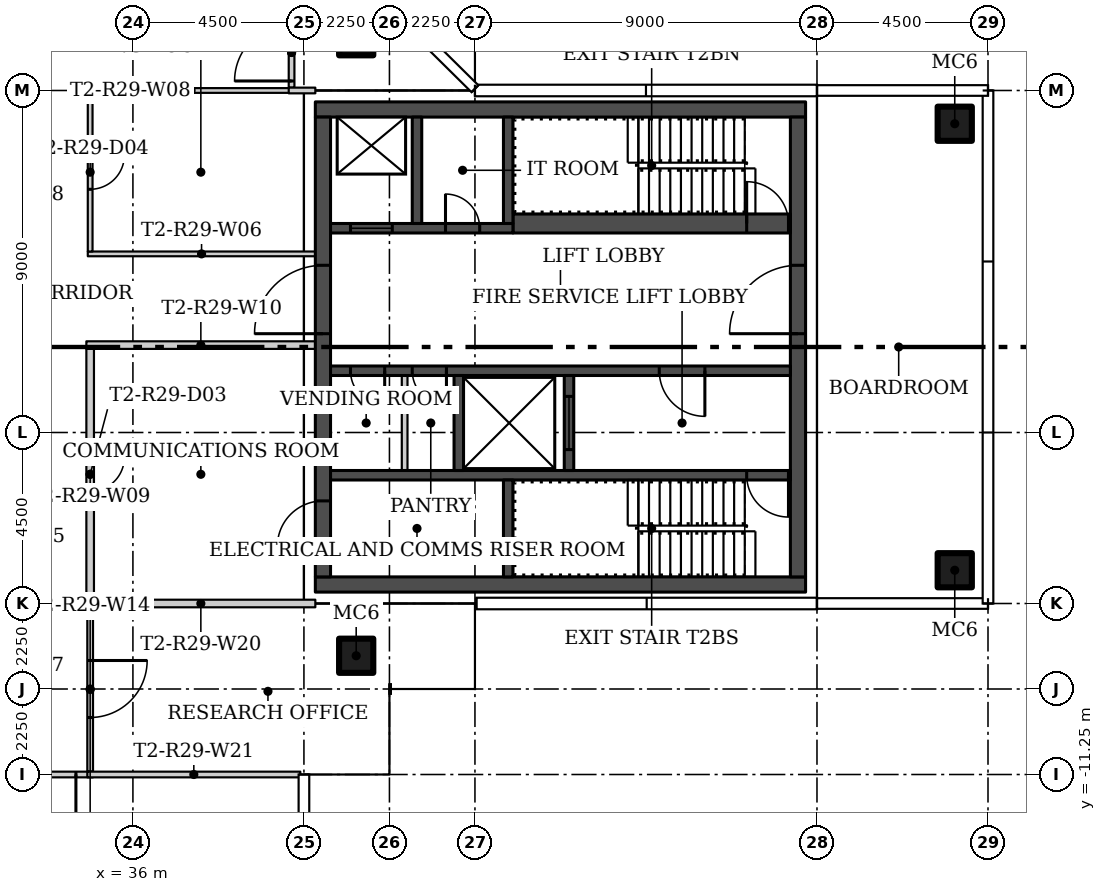
"""IFC4 building model, lengths in metres.
Left out: names, types, materials, properties, quantities, classifications, styles, units other than length and angle.
Written with IfcOpenShell. Run it as: python <this file> out.ifc"""

import sys

from ifc_helpers import new_model, si_unit, direction, frame, frame_2d, origin, origin_2d, place, context, subcontext, project, spatial, rectangle, hollow_rectangle, extrude, element, fill, save


model = new_model("IFC4")
c1 = context("Model", 3, precision=1e-05, world=origin(), true_north=direction((0.0, 1.0)))
c2 = subcontext(c1, "Body", "Model", "MODEL_VIEW")
j1 = project(units=[si_unit("LENGTHUNIT", "METRE"), si_unit("PLANEANGLEUNIT", "RADIAN")], contexts=[c1])
p1 = place(None, origin())
s1 = spatial("IfcSite", under=j1, at=p1, CompositionType="ELEMENT")
p2 = place(p1, origin())
s2 = spatial("IfcBuilding", under=s1, at=p2, CompositionType="ELEMENT")
p3 = place(p2, frame((0.0, 0.0, 261.6)))
s3 = spatial("IfcBuildingStorey", under=s2, at=p3, CompositionType="ELEMENT", Elevation=261.6)
for number, where in (
    (1, (41.875, 8.125, 0.0)),
    (2, (41.875, -8.125, 0.0)),
    (3, (57.625, -5.875, 0.0)),
    (4, (57.625, 5.875, 0.0)),
):
    element("IfcColumn", number, at=place(p3, frame(where)), inside=s3, PredefinedType="COLUMN", context=c2, shape_type="SweptSolid", body=[
        extrude(hollow_rectangle(XDim=0.9, YDim=0.9, WallThickness=0.036, at=origin_2d()), origin(), (0.0, 0.0, 1.0), 3.55),
    ])
p4 = place(p3, frame((34.812, 2.45, 0.0)))
e5 = element("IfcWall", 5, at=p4, inside=s3, PredefinedType="PARTITIONING", context=c2, shape_type="SweptSolid", body=[
    extrude(rectangle(XDim=5.988, YDim=0.125, at=frame_2d((2.994, 0.0))), origin(), (0.0, 0.0, 1.0), 3.55),
])
p5 = place(p3, frame((34.875, 6.688, 0.0), z_axis=(0.0, 0.0, 1.0), x_axis=(0.0, -1.0, 0.0)))
e6 = element("IfcWall", 6, at=p5, inside=s3, PredefinedType="PARTITIONING", context=c2, shape_type="SweptSolid", body=[
    extrude(rectangle(XDim=4.175, YDim=0.125, at=frame_2d((2.087, 0.0))), origin(), (0.0, 0.0, 1.0), 3.55),
])
p6 = place(p5, frame((1.637, 0.0, 0.0)))
e7 = element("IfcOpeningElement", 7, at=p6, cuts=e6, PredefinedType="OPENING", context=c2, shape_type="SweptSolid", body=[
    extrude(rectangle(XDim=0.9, YDim=2.1, at=frame_2d((0.45, 1.05))), frame((0.0, 0.073, 0.0), z_axis=(0.0, -1.0, 0.0), x_axis=(1.0, 0.0, 0.0)), (0.0, 0.0, 1.0), 0.145),
])
p7 = place(p3, frame((40.25, 6.75, 0.0), z_axis=(0.0, 0.0, 1.0), x_axis=(-1.0, 0.0, 0.0)))
e8 = element("IfcWall", 8, at=p7, inside=s3, PredefinedType="PARTITIONING", context=c2, shape_type="SweptSolid", body=[
    extrude(rectangle(XDim=5.437, YDim=0.125, at=frame_2d((2.719, 0.0))), origin(), (0.0, 0.0, 1.0), 3.55),
])
p8 = place(p3, frame((34.875, -0.05, 0.0), z_axis=(0.0, 0.0, 1.0), x_axis=(0.0, -1.0, 0.0)))
e9 = element("IfcWall", 9, at=p8, inside=s3, PredefinedType="PARTITIONING", context=c2, shape_type="SweptSolid", body=[
    extrude(rectangle(XDim=6.6, YDim=0.2, at=frame_2d((3.3, 0.0))), origin(), (0.0, 0.0, 1.0), 3.55),
])
p9 = place(p8, frame((2.85, 0.0, 0.0)))
e10 = element("IfcOpeningElement", 10, at=p9, cuts=e9, PredefinedType="OPENING", context=c2, shape_type="SweptSolid", body=[
    extrude(rectangle(XDim=0.9, YDim=2.1, at=frame_2d((0.45, 1.05))), frame((0.0, 0.11, 0.0), z_axis=(0.0, -1.0, 0.0), x_axis=(1.0, 0.0, 0.0)), (0.0, 0.0, 1.0), 0.22),
])
p10 = place(p3, frame((40.8, 0.05, 0.0), z_axis=(0.0, 0.0, 1.0), x_axis=(-1.0, 0.0, 0.0)))
e11 = element("IfcWall", 11, at=p10, inside=s3, PredefinedType="PARTITIONING", context=c2, shape_type="SweptSolid", body=[
    extrude(rectangle(XDim=6.025, YDim=0.2, at=frame_2d((3.013, 0.0))), origin(), (0.0, 0.0, 1.0), 3.55),
])
p11 = place(p3, frame((40.175, 6.825, 0.0), z_axis=(0.0, 0.0, 1.0), x_axis=(0.0, 1.0, 0.0)))
e12 = element("IfcWall", 12, at=p11, inside=s3, PredefinedType="PARTITIONING", context=c2, shape_type="SweptSolid", body=[
    extrude(rectangle(XDim=1.85, YDim=0.15, at=frame_2d((0.925, 0.0))), origin(), (0.0, 0.0, 1.0), 3.55),
])
p12 = place(p11, frame((0.175, 0.0, 0.0)))
e13 = element("IfcOpeningElement", 13, at=p12, cuts=e12, PredefinedType="OPENING", context=c2, shape_type="SweptSolid", body=[
    extrude(rectangle(XDim=1.5, YDim=2.1, at=frame_2d((0.75, 1.05))), frame((0.0, 0.085, 0.0), z_axis=(0.0, -1.0, 0.0), x_axis=(1.0, 0.0, 0.0)), (0.0, 0.0, 1.0), 0.17),
])
p13 = place(p3, frame((34.875, -6.85, 0.0), z_axis=(0.0, 0.0, 1.0), x_axis=(0.0, -1.0, 0.0)))
e14 = element("IfcWall", 14, at=p13, inside=s3, PredefinedType="PARTITIONING", context=c2, shape_type="SweptSolid", body=[
    extrude(rectangle(XDim=4.325, YDim=0.15, at=frame_2d((2.163, 0.0))), origin(), (0.0, 0.0, 1.0), 3.55),
])
p14 = place(p13, frame((1.4, 0.0, 0.0)))
e15 = element("IfcOpeningElement", 15, at=p14, cuts=e14, PredefinedType="OPENING", context=c2, shape_type="SweptSolid", body=[
    extrude(rectangle(XDim=1.5, YDim=2.1, at=frame_2d((0.75, 1.05))), frame((0.0, 0.085, 0.0), z_axis=(0.0, -1.0, 0.0), x_axis=(1.0, 0.0, 0.0)), (0.0, 0.0, 1.0), 0.17),
])
p15 = place(p3, frame((34.95, -11.25, 0.0), z_axis=(0.0, 0.0, 1.0), x_axis=(-1.0, 0.0, 0.0)))
e16 = element("IfcWall", 16, at=p15, inside=s3, PredefinedType="PARTITIONING", context=c2, shape_type="SweptSolid", body=[
    extrude(rectangle(XDim=2.4, YDim=0.15, at=frame_2d((1.2, 0.0))), origin(), (0.0, 0.0, 1.0), 3.55),
])
p16 = place(p15, frame((0.45, 0.0, 0.0)))
e17 = element("IfcOpeningElement", 17, at=p16, cuts=e16, PredefinedType="OPENING", context=c2, shape_type="SweptSolid", body=[
    extrude(rectangle(XDim=1.5, YDim=2.1, at=frame_2d((0.75, 1.05))), frame((0.0, 0.085, 0.0), z_axis=(0.0, -1.0, 0.0), x_axis=(1.0, 0.0, 0.0)), (0.0, 0.0, 1.0), 0.17),
])
p17 = place(p3, frame((40.8, 6.75, 0.0), z_axis=(0.0, 0.0, 1.0), x_axis=(-1.0, 0.0, 0.0)))
e18 = element("IfcWall", 18, at=p17, inside=s3, PredefinedType="PARTITIONING", context=c2, shape_type="SweptSolid", body=[
    extrude(rectangle(XDim=0.7, YDim=0.15, at=frame_2d((0.35, 0.0))), origin(), (0.0, 0.0, 1.0), 3.55),
])
p18 = place(p3, frame((34.775, -6.75, 0.0)))
e19 = element("IfcWall", 19, at=p18, inside=s3, PredefinedType="PARTITIONING", context=c2, shape_type="SweptSolid", body=[
    extrude(rectangle(XDim=6.025, YDim=0.2, at=frame_2d((3.013, 0.0))), origin(), (0.0, 0.0, 1.0), 3.55),
])
p19 = place(p3, frame((34.8, -11.25, 0.0)))
e20 = element("IfcWall", 20, at=p19, inside=s3, PredefinedType="PARTITIONING", context=c2, shape_type="SweptSolid", body=[
    extrude(rectangle(XDim=5.605, YDim=0.15, at=frame_2d((2.802, 0.0))), origin(), (0.0, 0.0, 1.0), 3.55),
])
for number, where, z_axis, x_axis in (
    (21, (53.7, -6.25, 0.0), (0.0, 0.0, 1.0), (-1.0, 0.0, 0.0)),
    (22, (53.7, 6.25, 0.0), (0.0, 0.0, 1.0), (-1.0, 0.0, 0.0)),
):
    element("IfcWall", number, at=place(p3, frame(where, z_axis=z_axis, x_axis=x_axis)), inside=s3, PredefinedType="SHEAR", context=c2, shape_type="SweptSolid", body=[
        extrude(rectangle(XDim=12.9, YDim=0.4, at=frame_2d((6.45, 0.0))), origin(), (0.0, 0.0, 1.0), 3.55),
    ])
p20 = place(p3, frame((53.5, -6.05, 0.0), z_axis=(0.0, 0.0, 1.0), x_axis=(0.0, 1.0, 0.0)))
e23 = element("IfcWall", 23, at=p20, inside=s3, PredefinedType="SHEAR", context=c2, shape_type="SweptSolid", body=[
    extrude(rectangle(XDim=12.1, YDim=0.4, at=frame_2d((6.05, 0.0))), origin(), (0.0, 0.0, 1.0), 3.55),
])
p21 = place(p20, frame((6.4, 0.0, 0.0)))
e24 = element("IfcOpeningElement", 24, at=p21, cuts=e23, PredefinedType="OPENING", context=c2, shape_type="SweptSolid", body=[
    extrude(rectangle(XDim=1.8, YDim=2.4, at=frame_2d((0.9, 1.2))), frame((0.0, 0.21, 0.0), z_axis=(0.0, -1.0, 0.0), x_axis=(1.0, 0.0, 0.0)), (0.0, 0.0, 1.0), 0.42),
])
p22 = place(p3, frame((41.0, -6.05, 0.0), z_axis=(0.0, 0.0, 1.0), x_axis=(0.0, 1.0, 0.0)))
e25 = element("IfcWall", 25, at=p22, inside=s3, PredefinedType="SHEAR", context=c2, shape_type="SweptSolid", body=[
    extrude(rectangle(XDim=12.1, YDim=0.4, at=frame_2d((6.05, 0.0))), origin(), (0.0, 0.0, 1.0), 3.55),
])
p23 = place(p22, frame((0.8, 0.0, 0.0)))
e26 = element("IfcOpeningElement", 26, at=p23, cuts=e25, PredefinedType="OPENING", context=c2, shape_type="SweptSolid", body=[
    extrude(rectangle(XDim=1.2, YDim=2.1, at=frame_2d((0.6, 1.05))), frame((0.0, 0.21, 0.0), z_axis=(0.0, -1.0, 0.0), x_axis=(1.0, 0.0, 0.0)), (0.0, 0.0, 1.0), 0.42),
])
p24 = place(p22, frame((6.4, 0.0, 0.0)))
e27 = element("IfcOpeningElement", 27, at=p24, cuts=e25, PredefinedType="OPENING", context=c2, shape_type="SweptSolid", body=[
    extrude(rectangle(XDim=1.8, YDim=2.4, at=frame_2d((0.9, 1.2))), frame((0.0, 0.21, 0.0), z_axis=(0.0, -1.0, 0.0), x_axis=(1.0, 0.0, 0.0)), (0.0, 0.0, 1.0), 0.42),
])
p25 = place(p3, frame((53.3, -3.375, 0.0), z_axis=(0.0, 0.0, 1.0), x_axis=(-1.0, 0.0, 0.0)))
e28 = element("IfcWall", 28, at=p25, inside=s3, PredefinedType="SHEAR", context=c2, shape_type="SweptSolid", body=[
    extrude(rectangle(XDim=12.1, YDim=0.25, at=frame_2d((6.05, 0.0))), origin(), (0.0, 0.0, 1.0), 3.55),
])
p26 = place(p25, frame((0.05, 0.0, 0.0)))
e29 = element("IfcOpeningElement", 29, at=p26, cuts=e28, PredefinedType="OPENING", context=c2, shape_type="SweptSolid", body=[
    extrude(rectangle(XDim=1.1, YDim=2.1, at=frame_2d((0.55, 1.05))), frame((0.0, 0.135, 0.0), z_axis=(0.0, -1.0, 0.0), x_axis=(1.0, 0.0, 0.0)), (0.0, 0.0, 1.0), 0.27),
])
p27 = place(p3, frame((45.875, -6.05, 0.0), z_axis=(0.0, 0.0, 1.0), x_axis=(0.0, 1.0, 0.0)))
e30 = element("IfcWall", 30, at=p27, inside=s3, PredefinedType="SHEAR", context=c2, shape_type="SweptSolid", body=[
    extrude(rectangle(XDim=2.55, YDim=0.25, at=frame_2d((1.275, 0.0))), origin(), (0.0, 0.0, 1.0), 3.55),
])
p28 = place(p3, frame((53.3, -0.625, 0.0), z_axis=(0.0, 0.0, 1.0), x_axis=(-1.0, 0.0, 0.0)))
e31 = element("IfcWall", 31, at=p28, inside=s3, PredefinedType="SHEAR", context=c2, shape_type="SweptSolid", body=[
    extrude(rectangle(XDim=12.1, YDim=0.25, at=frame_2d((6.05, 0.0))), origin(), (0.0, 0.0, 1.0), 3.55),
])
p29 = place(p28, frame((2.25, 0.0, 0.0)))
e32 = element("IfcOpeningElement", 32, at=p29, cuts=e31, PredefinedType="OPENING", context=c2, shape_type="SweptSolid", body=[
    extrude(rectangle(XDim=1.2, YDim=2.1, at=frame_2d((0.6, 1.05))), frame((0.0, 0.135, 0.0), z_axis=(0.0, -1.0, 0.0), x_axis=(1.0, 0.0, 0.0)), (0.0, 0.0, 1.0), 0.27),
])
p30 = place(p28, frame((9.05, 0.0, 0.0)))
e33 = element("IfcOpeningElement", 33, at=p30, cuts=e31, PredefinedType="OPENING", context=c2, shape_type="SweptSolid", body=[
    extrude(rectangle(XDim=0.9, YDim=2.1, at=frame_2d((0.45, 1.05))), frame((0.0, 0.135, 0.0), z_axis=(0.0, -1.0, 0.0), x_axis=(1.0, 0.0, 0.0)), (0.0, 0.0, 1.0), 0.27),
])
p31 = place(p28, frame((10.675, 0.0, 0.0)))
e34 = element("IfcOpeningElement", 34, at=p31, cuts=e31, PredefinedType="OPENING", context=c2, shape_type="SweptSolid", body=[
    extrude(rectangle(XDim=0.9, YDim=2.1, at=frame_2d((0.45, 1.05))), frame((0.0, 0.135, 0.0), z_axis=(0.0, -1.0, 0.0), x_axis=(1.0, 0.0, 0.0)), (0.0, 0.0, 1.0), 0.27),
])
p32 = place(p3, frame((47.475, -3.25, 0.0), z_axis=(0.0, 0.0, 1.0), x_axis=(0.0, 1.0, 0.0)))
e35 = element("IfcWall", 35, at=p32, inside=s3, PredefinedType="SHEAR", context=c2, shape_type="SweptSolid", body=[
    extrude(rectangle(XDim=2.5, YDim=0.25, at=frame_2d((1.25, 0.0))), origin(), (0.0, 0.0, 1.0), 3.55),
])
p33 = place(p32, frame((0.55, 0.0, 0.0)))
e36 = element("IfcOpeningElement", 36, at=p33, cuts=e35, PredefinedType="OPENING", context=c2, shape_type="SweptSolid", body=[
    extrude(rectangle(XDim=1.4, YDim=2.4, at=frame_2d((0.7, 1.2))), frame((0.0, 0.135, 0.0), z_axis=(0.0, -1.0, 0.0), x_axis=(1.0, 0.0, 0.0)), (0.0, 0.0, 1.0), 0.27),
])
p34 = place(p3, frame((44.575, -3.25, 0.0), z_axis=(0.0, 0.0, 1.0), x_axis=(0.0, 1.0, 0.0)))
e37 = element("IfcWall", 37, at=p34, inside=s3, PredefinedType="SHEAR", context=c2, shape_type="SweptSolid", body=[
    extrude(rectangle(XDim=2.5, YDim=0.25, at=frame_2d((1.25, 0.0))), origin(), (0.0, 0.0, 1.0), 3.55),
])
p35 = place(p3, frame((43.15, -3.25, 0.0), z_axis=(0.0, 0.0, 1.0), x_axis=(0.0, 1.0, 0.0)))
e38 = element("IfcWall", 38, at=p35, inside=s3, PredefinedType="PARTITIONING", context=c2, shape_type="SweptSolid", body=[
    extrude(rectangle(XDim=2.5, YDim=0.15, at=frame_2d((1.25, 0.0))), origin(), (0.0, 0.0, 1.0), 3.55),
])
p36 = place(p3, frame((46.0, 3.25, 0.0)))
e39 = element("IfcWall", 39, at=p36, inside=s3, PredefinedType="SHEAR", context=c2, shape_type="SweptSolid", body=[
    extrude(rectangle(XDim=7.3, YDim=0.5, at=frame_2d((3.65, 0.0))), origin(), (0.0, 0.0, 1.0), 3.55),
])
p37 = place(p36, frame((6.15, 0.0, 0.0)))
e40 = element("IfcOpeningElement", 40, at=p37, cuts=e39, PredefinedType="OPENING", context=c2, shape_type="SweptSolid", body=[
    extrude(rectangle(XDim=1.1, YDim=2.1, at=frame_2d((0.55, 1.05))), frame((0.0, 0.26, 0.0), z_axis=(0.0, -1.0, 0.0), x_axis=(1.0, 0.0, 0.0)), (0.0, 0.0, 1.0), 0.52),
])
p38 = place(p3, frame((41.2, 3.125, 0.0)))
e41 = element("IfcWall", 41, at=p38, inside=s3, PredefinedType="SHEAR", context=c2, shape_type="SweptSolid", body=[
    extrude(rectangle(XDim=4.8, YDim=0.25, at=frame_2d((2.4, 0.0))), origin(), (0.0, 0.0, 1.0), 3.55),
])
p39 = place(p38, frame((0.525, 0.0, 0.0)))
e42 = element("IfcOpeningElement", 42, at=p39, cuts=e41, PredefinedType="OPENING", context=c2, shape_type="SweptSolid", body=[
    extrude(rectangle(XDim=1.1, YDim=2.1, at=frame_2d((0.55, 1.05))), frame((0.0, 0.135, 0.0), z_axis=(0.0, -1.0, 0.0), x_axis=(1.0, 0.0, 0.0)), (0.0, 0.0, 1.0), 0.27),
])
p40 = place(p38, frame((3.025, 0.0, 0.0)))
e43 = element("IfcOpeningElement", 43, at=p40, cuts=e41, PredefinedType="OPENING", context=c2, shape_type="SweptSolid", body=[
    extrude(rectangle(XDim=0.9, YDim=2.1, at=frame_2d((0.45, 1.05))), frame((0.0, 0.135, 0.0), z_axis=(0.0, -1.0, 0.0), x_axis=(1.0, 0.0, 0.0)), (0.0, 0.0, 1.0), 0.27),
])
for number, where, z_axis, x_axis in (
    (44, (45.875, 3.25, 0.0), (0.0, 0.0, 1.0), (0.0, 1.0, 0.0)),
    (45, (43.475, 3.25, 0.0), (0.0, 0.0, 1.0), (0.0, 1.0, 0.0)),
):
    element("IfcWall", number, at=place(p3, frame(where, z_axis=z_axis, x_axis=x_axis)), inside=s3, PredefinedType="SHEAR", context=c2, shape_type="SweptSolid", body=[
        extrude(rectangle(XDim=2.8, YDim=0.25, at=frame_2d((1.4, 0.0))), origin(), (0.0, 0.0, 1.0), 3.55),
    ])
p41 = place(p12, origin())
e46 = element("IfcDoor", 46, at=p41, inside=s3, OperationType="DOUBLE_DOOR_SINGLE_SWING", PredefinedType="DOOR", context=c2, shape_type="SweptSolid", body=[
    extrude(rectangle(XDim=1.5, YDim=2.1, at=frame_2d((0.75, 1.05))), frame((0.0, 0.025, 0.0), z_axis=(0.0, -1.0, 0.0), x_axis=(1.0, 0.0, 0.0)), (0.0, 0.0, 1.0), 0.05),
])
fill(e13, e46)
p42 = place(p14, origin())
e47 = element("IfcDoor", 47, at=p42, inside=s3, OperationType="DOUBLE_DOOR_SINGLE_SWING", PredefinedType="DOOR", context=c2, shape_type="SweptSolid", body=[
    extrude(rectangle(XDim=1.5, YDim=2.1, at=frame_2d((0.75, 1.05))), frame((0.0, 0.025, 0.0), z_axis=(0.0, -1.0, 0.0), x_axis=(1.0, 0.0, 0.0)), (0.0, 0.0, 1.0), 0.05),
])
fill(e15, e47)
p43 = place(p9, origin())
e48 = element("IfcDoor", 48, at=p43, inside=s3, OperationType="SINGLE_SWING_LEFT", PredefinedType="DOOR", context=c2, shape_type="SweptSolid", body=[
    extrude(rectangle(XDim=0.9, YDim=2.1, at=frame_2d((0.45, 1.05))), frame((0.0, 0.025, 0.0), z_axis=(0.0, -1.0, 0.0), x_axis=(1.0, 0.0, 0.0)), (0.0, 0.0, 1.0), 0.05),
])
fill(e10, e48)
p44 = place(p6, origin())
e49 = element("IfcDoor", 49, at=p44, inside=s3, OperationType="SINGLE_SWING_RIGHT", PredefinedType="DOOR", context=c2, shape_type="SweptSolid", body=[
    extrude(rectangle(XDim=0.9, YDim=2.1, at=frame_2d((0.45, 1.05))), frame((0.0, 0.025, 0.0), z_axis=(0.0, -1.0, 0.0), x_axis=(1.0, 0.0, 0.0)), (0.0, 0.0, 1.0), 0.05),
])
fill(e7, e49)
p45 = place(p16, origin())
e50 = element("IfcDoor", 50, at=p45, inside=s3, OperationType="DOUBLE_DOOR_SINGLE_SWING", PredefinedType="DOOR", context=c2, shape_type="SweptSolid", body=[
    extrude(rectangle(XDim=1.5, YDim=2.1, at=frame_2d((0.75, 1.05))), frame((0.0, 0.025, 0.0), z_axis=(0.0, -1.0, 0.0), x_axis=(1.0, 0.0, 0.0)), (0.0, 0.0, 1.0), 0.05),
])
fill(e17, e50)
p46 = place(p21, origin())
e51 = element("IfcDoor", 51, at=p46, inside=s3, OperationType="DOUBLE_DOOR_SINGLE_SWING", PredefinedType="DOOR", context=c2, shape_type="SweptSolid", body=[
    extrude(rectangle(XDim=1.8, YDim=2.4, at=frame_2d((0.9, 1.2))), frame((0.0, 0.025, 0.0), z_axis=(0.0, -1.0, 0.0), x_axis=(1.0, 0.0, 0.0)), (0.0, 0.0, 1.0), 0.05),
])
fill(e24, e51)
p47 = place(p23, origin())
e52 = element("IfcDoor", 52, at=p47, inside=s3, OperationType="SINGLE_SWING_LEFT", PredefinedType="DOOR", context=c2, shape_type="SweptSolid", body=[
    extrude(rectangle(XDim=1.2, YDim=2.1, at=frame_2d((0.6, 1.05))), frame((0.0, 0.025, 0.0), z_axis=(0.0, -1.0, 0.0), x_axis=(1.0, 0.0, 0.0)), (0.0, 0.0, 1.0), 0.05),
])
fill(e26, e52)
p48 = place(p24, origin())
e53 = element("IfcDoor", 53, at=p48, inside=s3, OperationType="DOUBLE_DOOR_SINGLE_SWING", PredefinedType="DOOR", context=c2, shape_type="SweptSolid", body=[
    extrude(rectangle(XDim=1.8, YDim=2.4, at=frame_2d((0.9, 1.2))), frame((0.0, 0.025, 0.0), z_axis=(0.0, -1.0, 0.0), x_axis=(1.0, 0.0, 0.0)), (0.0, 0.0, 1.0), 0.05),
])
fill(e27, e53)
p49 = place(p26, origin())
e54 = element("IfcDoor", 54, at=p49, inside=s3, OperationType="SINGLE_SWING_LEFT", PredefinedType="DOOR", context=c2, shape_type="SweptSolid", body=[
    extrude(rectangle(XDim=1.1, YDim=2.1, at=frame_2d((0.55, 1.05))), frame((0.0, 0.025, 0.0), z_axis=(0.0, -1.0, 0.0), x_axis=(1.0, 0.0, 0.0)), (0.0, 0.0, 1.0), 0.05),
])
fill(e29, e54)
p50 = place(p29, origin())
e55 = element("IfcDoor", 55, at=p50, inside=s3, OperationType="SINGLE_SWING_LEFT", PredefinedType="DOOR", context=c2, shape_type="SweptSolid", body=[
    extrude(rectangle(XDim=1.2, YDim=2.1, at=frame_2d((0.6, 1.05))), frame((0.0, 0.025, 0.0), z_axis=(0.0, -1.0, 0.0), x_axis=(1.0, 0.0, 0.0)), (0.0, 0.0, 1.0), 0.05),
])
fill(e32, e55)
p51 = place(p30, origin())
e56 = element("IfcDoor", 56, at=p51, inside=s3, OperationType="SINGLE_SWING_RIGHT", PredefinedType="DOOR", context=c2, shape_type="SweptSolid", body=[
    extrude(rectangle(XDim=0.9, YDim=2.1, at=frame_2d((0.45, 1.05))), frame((0.0, 0.025, 0.0), z_axis=(0.0, -1.0, 0.0), x_axis=(1.0, 0.0, 0.0)), (0.0, 0.0, 1.0), 0.05),
])
fill(e33, e56)
p52 = place(p31, origin())
e57 = element("IfcDoor", 57, at=p52, inside=s3, OperationType="SINGLE_SWING_RIGHT", PredefinedType="DOOR", context=c2, shape_type="SweptSolid", body=[
    extrude(rectangle(XDim=0.9, YDim=2.1, at=frame_2d((0.45, 1.05))), frame((0.0, 0.025, 0.0), z_axis=(0.0, -1.0, 0.0), x_axis=(1.0, 0.0, 0.0)), (0.0, 0.0, 1.0), 0.05),
])
fill(e34, e57)
p53 = place(p33, origin())
e58 = element("IfcDoor", 58, at=p53, inside=s3, OperationType="SLIDING_TO_LEFT", PredefinedType="DOOR", context=c2, shape_type="SweptSolid", body=[
    extrude(rectangle(XDim=1.4, YDim=2.4, at=frame_2d((0.7, 1.2))), frame((0.0, 0.025, 0.0), z_axis=(0.0, -1.0, 0.0), x_axis=(1.0, 0.0, 0.0)), (0.0, 0.0, 1.0), 0.05),
])
fill(e36, e58)
p54 = place(p37, origin())
e59 = element("IfcDoor", 59, at=p54, inside=s3, OperationType="SINGLE_SWING_RIGHT", PredefinedType="DOOR", context=c2, shape_type="SweptSolid", body=[
    extrude(rectangle(XDim=1.1, YDim=2.1, at=frame_2d((0.55, 1.05))), frame((0.0, 0.025, 0.0), z_axis=(0.0, -1.0, 0.0), x_axis=(1.0, 0.0, 0.0)), (0.0, 0.0, 1.0), 0.05),
])
fill(e40, e59)
p55 = place(p39, origin())
e60 = element("IfcDoor", 60, at=p55, inside=s3, OperationType="SLIDING_TO_LEFT", PredefinedType="DOOR", context=c2, shape_type="SweptSolid", body=[
    extrude(rectangle(XDim=1.1, YDim=2.1, at=frame_2d((0.55, 1.05))), frame((0.0, 0.025, 0.0), z_axis=(0.0, -1.0, 0.0), x_axis=(1.0, 0.0, 0.0)), (0.0, 0.0, 1.0), 0.05),
])
fill(e42, e60)
p56 = place(p40, origin())
e61 = element("IfcDoor", 61, at=p56, inside=s3, OperationType="SINGLE_SWING_RIGHT", PredefinedType="DOOR", context=c2, shape_type="SweptSolid", body=[
    extrude(rectangle(XDim=0.9, YDim=2.1, at=frame_2d((0.45, 1.05))), frame((0.0, 0.025, 0.0), z_axis=(0.0, -1.0, 0.0), x_axis=(1.0, 0.0, 0.0)), (0.0, 0.0, 1.0), 0.05),
])
fill(e43, e61)
save(model, sys.argv[1])
